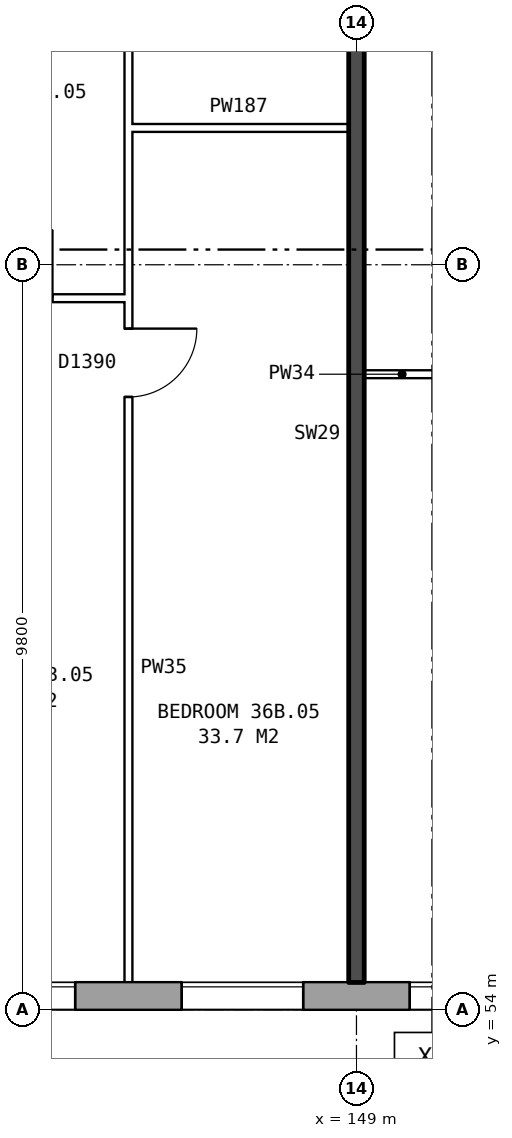
"""IFC4 building model, lengths in metres.
Left out: names, types, materials, properties, quantities, classifications, styles, units other than length and angle.
Written with IfcOpenShell. Run it as: python <this file> out.ifc"""

import sys

from ifc_helpers import new_model, si_unit, direction, frame, frame_2d, origin, place, context, subcontext, project, spatial, rectangle, extrude, element, fill, save


model = new_model("IFC4")
c1 = context("Model", 3, precision=1e-05, world=origin(), true_north=direction((0.0, 1.0)))
c2 = subcontext(c1, "Body", "Model", "MODEL_VIEW")
j1 = project(units=[si_unit("LENGTHUNIT", "METRE"), si_unit("PLANEANGLEUNIT", "RADIAN")], contexts=[c1])
p1 = place(None, origin())
s1 = spatial("IfcSite", under=j1, at=p1, CompositionType="ELEMENT")
p2 = place(p1, origin())
s2 = spatial("IfcBuilding", under=s1, at=p2, CompositionType="ELEMENT")
p3 = place(p2, frame((0.0, 0.0, 129.9)))
s3 = spatial("IfcBuildingStorey", under=s2, at=p3, CompositionType="ELEMENT", Elevation=129.9)
p4 = place(p3, frame((134.075, 54.18, 0.0), z_axis=(0.0, 0.0, 1.0), x_axis=(1.0, 0.0, 0.0)))
e1 = element("IfcWall", 1, at=p4, inside=s3, PredefinedType="STANDARD", context=c2, shape_type="SweptSolid", body=[
    extrude(rectangle(XDim=35.601, YDim=0.36, at=frame_2d((17.8, 0.0))), origin(), (0.0, 0.0, 1.0), 2.85),
])
p5 = place(p4, frame((0.625, 0.0, 0.8)))
e2 = element("IfcOpeningElement", 2, at=p5, cuts=e1, PredefinedType="OPENING", context=c2, shape_type="SweptSolid", body=[
    extrude(rectangle(XDim=1.6, YDim=1.8, at=frame_2d((0.8, 0.9))), frame((0.0, 0.19, 0.0), z_axis=(0.0, -1.0, 0.0), x_axis=(1.0, 0.0, 0.0)), (0.0, 0.0, 1.0), 0.38),
])
p6 = place(p4, frame((3.625, 0.0, 0.8)))
e3 = element("IfcOpeningElement", 3, at=p6, cuts=e1, PredefinedType="OPENING", context=c2, shape_type="SweptSolid", body=[
    extrude(rectangle(XDim=1.6, YDim=1.8, at=frame_2d((0.8, 0.9))), frame((0.0, 0.19, 0.0), z_axis=(0.0, -1.0, 0.0), x_axis=(1.0, 0.0, 0.0)), (0.0, 0.0, 1.0), 0.38),
])
p7 = place(p4, frame((5.525, 0.0, 0.8)))
e4 = element("IfcOpeningElement", 4, at=p7, cuts=e1, PredefinedType="OPENING", context=c2, shape_type="SweptSolid", body=[
    extrude(rectangle(XDim=1.2, YDim=1.8, at=frame_2d((0.6, 0.9))), frame((0.0, 0.19, 0.0), z_axis=(0.0, -1.0, 0.0), x_axis=(1.0, 0.0, 0.0)), (0.0, 0.0, 1.0), 0.38),
])
p8 = place(p4, frame((9.625, 0.0, 0.8)))
e5 = element("IfcOpeningElement", 5, at=p8, cuts=e1, PredefinedType="OPENING", context=c2, shape_type="SweptSolid", body=[
    extrude(rectangle(XDim=1.6, YDim=1.8, at=frame_2d((0.8, 0.9))), frame((0.0, 0.19, 0.0), z_axis=(0.0, -1.0, 0.0), x_axis=(1.0, 0.0, 0.0)), (0.0, 0.0, 1.0), 0.38),
])
p9 = place(p4, frame((12.625, 0.0, 0.8)))
e6 = element("IfcOpeningElement", 6, at=p9, cuts=e1, PredefinedType="OPENING", context=c2, shape_type="SweptSolid", body=[
    extrude(rectangle(XDim=1.6, YDim=1.8, at=frame_2d((0.8, 0.9))), frame((0.0, 0.19, 0.0), z_axis=(0.0, -1.0, 0.0), x_axis=(1.0, 0.0, 0.0)), (0.0, 0.0, 1.0), 0.38),
])
p10 = place(p4, frame((15.625, 0.0, 0.8)))
e7 = element("IfcOpeningElement", 7, at=p10, cuts=e1, PredefinedType="OPENING", context=c2, shape_type="SweptSolid", body=[
    extrude(rectangle(XDim=1.6, YDim=1.8, at=frame_2d((0.8, 0.9))), frame((0.0, 0.19, 0.0), z_axis=(0.0, -1.0, 0.0), x_axis=(1.0, 0.0, 0.0)), (0.0, 0.0, 1.0), 0.38),
])
p11 = place(p4, frame((18.625, 0.0, 0.8)))
e8 = element("IfcOpeningElement", 8, at=p11, cuts=e1, PredefinedType="OPENING", context=c2, shape_type="SweptSolid", body=[
    extrude(rectangle(XDim=1.6, YDim=1.8, at=frame_2d((0.8, 0.9))), frame((0.0, 0.19, 0.0), z_axis=(0.0, -1.0, 0.0), x_axis=(1.0, 0.0, 0.0)), (0.0, 0.0, 1.0), 0.38),
])
p12 = place(p4, frame((21.625, 0.0, 0.8)))
e9 = element("IfcOpeningElement", 9, at=p12, cuts=e1, PredefinedType="OPENING", context=c2, shape_type="SweptSolid", body=[
    extrude(rectangle(XDim=1.6, YDim=1.8, at=frame_2d((0.8, 0.9))), frame((0.0, 0.19, 0.0), z_axis=(0.0, -1.0, 0.0), x_axis=(1.0, 0.0, 0.0)), (0.0, 0.0, 1.0), 0.38),
])
p13 = place(p4, frame((24.625, 0.0, 0.8)))
e10 = element("IfcOpeningElement", 10, at=p13, cuts=e1, PredefinedType="OPENING", context=c2, shape_type="SweptSolid", body=[
    extrude(rectangle(XDim=1.6, YDim=1.8, at=frame_2d((0.8, 0.9))), frame((0.0, 0.19, 0.0), z_axis=(0.0, -1.0, 0.0), x_axis=(1.0, 0.0, 0.0)), (0.0, 0.0, 1.0), 0.38),
])
p14 = place(p4, frame((27.825, 0.0, 1.7)))
e11 = element("IfcOpeningElement", 11, at=p14, cuts=e1, PredefinedType="OPENING", context=c2, shape_type="SweptSolid", body=[
    extrude(rectangle(XDim=0.6, YDim=0.9, at=frame_2d((0.3, 0.45))), frame((0.0, 0.19, 0.0), z_axis=(0.0, -1.0, 0.0), x_axis=(1.0, 0.0, 0.0)), (0.0, 0.0, 1.0), 0.38),
])
p15 = place(p4, frame((30.625, 0.0, 0.8)))
e12 = element("IfcOpeningElement", 12, at=p15, cuts=e1, PredefinedType="OPENING", context=c2, shape_type="SweptSolid", body=[
    extrude(rectangle(XDim=1.6, YDim=1.8, at=frame_2d((0.8, 0.9))), frame((0.0, 0.19, 0.0), z_axis=(0.0, -1.0, 0.0), x_axis=(1.0, 0.0, 0.0)), (0.0, 0.0, 1.0), 0.38),
])
p16 = place(p4, frame((33.625, 0.0, 0.8)))
e13 = element("IfcOpeningElement", 13, at=p16, cuts=e1, PredefinedType="OPENING", context=c2, shape_type="SweptSolid", body=[
    extrude(rectangle(XDim=1.6, YDim=1.8, at=frame_2d((0.8, 0.9))), frame((0.0, 0.19, 0.0), z_axis=(0.0, -1.0, 0.0), x_axis=(1.0, 0.0, 0.0)), (0.0, 0.0, 1.0), 0.38),
])
p17 = place(p4, frame((7.025, 0.0, 1.6)))
e14 = element("IfcOpeningElement", 14, at=p17, cuts=e1, PredefinedType="OPENING", context=c2, shape_type="SweptSolid", body=[
    extrude(rectangle(XDim=0.6, YDim=0.9, at=frame_2d((0.3, 0.45))), frame((0.0, 0.19, 0.0), z_axis=(0.0, -1.0, 0.0), x_axis=(1.0, 0.0, 0.0)), (0.0, 0.0, 1.0), 0.38),
])
p18 = place(p4, frame((28.725, 0.0, 0.8)))
e15 = element("IfcOpeningElement", 15, at=p18, cuts=e1, PredefinedType="OPENING", context=c2, shape_type="SweptSolid", body=[
    extrude(rectangle(XDim=1.6, YDim=1.8, at=frame_2d((0.8, 0.9))), frame((0.0, 0.19, 0.0), z_axis=(0.0, -1.0, 0.0), x_axis=(1.0, 0.0, 0.0)), (0.0, 0.0, 1.0), 0.38),
])
p19 = place(p3, frame((149.1, 62.36, 0.0), z_axis=(0.0, 0.0, 1.0), x_axis=(1.0, 0.0, 0.0)))
e16 = element("IfcWall", 16, at=p19, inside=s3, PredefinedType="PARTITIONING", context=c2, shape_type="SweptSolid", body=[
    extrude(rectangle(XDim=2.9, YDim=0.1, at=frame_2d((1.45, 0.0))), origin(), (0.0, 0.0, 1.0), 2.85),
])
p20 = place(p19, frame((1.0, 0.0, 0.0)))
e17 = element("IfcOpeningElement", 17, at=p20, cuts=e16, PredefinedType="OPENING", context=c2, shape_type="SweptSolid", body=[
    extrude(rectangle(XDim=0.9, YDim=2.1, at=frame_2d((0.45, 1.05))), frame((0.0, 0.06, 0.0), z_axis=(0.0, -1.0, 0.0), x_axis=(1.0, 0.0, 0.0)), (0.0, 0.0, 1.0), 0.12),
])
p21 = place(p3, frame((143.1, 63.36, 0.0), z_axis=(0.0, 0.0, 1.0), x_axis=(1.0, 0.0, 0.0)))
e18 = element("IfcWall", 18, at=p21, inside=s3, PredefinedType="PARTITIONING", context=c2, shape_type="SweptSolid", body=[
    extrude(rectangle(XDim=2.9, YDim=0.1, at=frame_2d((1.45, 0.0))), origin(), (0.0, 0.0, 1.0), 2.85),
])
p22 = place(p21, frame((1.0, 0.0, 0.0)))
e19 = element("IfcOpeningElement", 19, at=p22, cuts=e18, PredefinedType="OPENING", context=c2, shape_type="SweptSolid", body=[
    extrude(rectangle(XDim=0.9, YDim=2.1, at=frame_2d((0.45, 1.05))), frame((0.0, 0.06, 0.0), z_axis=(0.0, -1.0, 0.0), x_axis=(1.0, 0.0, 0.0)), (0.0, 0.0, 1.0), 0.12),
])
p23 = place(p3, frame((146.0, 65.6, 0.0), z_axis=(0.0, 0.0, 1.0), x_axis=(1.0, 0.0, 0.0)))
e20 = element("IfcWall", 20, at=p23, inside=s3, PredefinedType="PARTITIONING", context=c2, shape_type="SweptSolid", body=[
    extrude(rectangle(XDim=2.9, YDim=0.1, at=frame_2d((1.45, 0.0))), origin(), (0.0, 0.0, 1.0), 2.85),
])
p24 = place(p3, frame((146.0, 54.36, 0.0), z_axis=(0.0, 0.0, 1.0), x_axis=(0.0, 1.0, 0.0)))
e21 = element("IfcWall", 21, at=p24, inside=s3, PredefinedType="PARTITIONING", context=c2, shape_type="SweptSolid", body=[
    extrude(rectangle(XDim=14.34, YDim=0.1, at=frame_2d((7.17, 0.0))), origin(), (0.0, 0.0, 1.0), 2.85),
])
p25 = place(p24, frame((7.7, 0.0, 0.0)))
e22 = element("IfcOpeningElement", 22, at=p25, cuts=e21, PredefinedType="OPENING", context=c2, shape_type="SweptSolid", body=[
    extrude(rectangle(XDim=0.9, YDim=2.1, at=frame_2d((0.45, 1.05))), frame((0.0, 0.06, 0.0), z_axis=(0.0, -1.0, 0.0), x_axis=(1.0, 0.0, 0.0)), (0.0, 0.0, 1.0), 0.12),
])
p26 = place(p24, frame((13.04, 0.0, 0.0)))
e23 = element("IfcOpeningElement", 23, at=p26, cuts=e21, PredefinedType="OPENING", context=c2, shape_type="SweptSolid", body=[
    extrude(rectangle(XDim=0.9, YDim=2.1, at=frame_2d((0.45, 1.05))), frame((0.0, 0.06, 0.0), z_axis=(0.0, -1.0, 0.0), x_axis=(1.0, 0.0, 0.0)), (0.0, 0.0, 1.0), 0.12),
])
p27 = place(p3, frame((149.0, 54.36, 0.0), z_axis=(0.0, 0.0, 1.0), x_axis=(0.0, 1.0, 0.0)))
e24 = element("IfcWall", 24, at=p27, inside=s3, PredefinedType="SOLIDWALL", context=c2, shape_type="SweptSolid", body=[
    extrude(rectangle(XDim=14.44, YDim=0.2, at=frame_2d((7.22, 0.0))), origin(), (0.0, 0.0, 1.0), 2.85),
])
p28 = place(p8, origin())
e25 = element("IfcWindow", 25, at=p28, inside=s3, PartitioningType="SINGLE_PANEL", PredefinedType="WINDOW", context=c2, shape_type="SweptSolid", body=[
    extrude(rectangle(XDim=1.6, YDim=1.8, at=frame_2d((0.8, 0.9))), frame((0.0, 0.15, 0.0), z_axis=(0.0, -1.0, 0.0), x_axis=(1.0, 0.0, 0.0)), (0.0, 0.0, 1.0), 0.06),
])
fill(e5, e25)
p29 = place(p9, origin())
e26 = element("IfcWindow", 26, at=p29, inside=s3, PartitioningType="SINGLE_PANEL", PredefinedType="WINDOW", context=c2, shape_type="SweptSolid", body=[
    extrude(rectangle(XDim=1.6, YDim=1.8, at=frame_2d((0.8, 0.9))), frame((0.0, 0.15, 0.0), z_axis=(0.0, -1.0, 0.0), x_axis=(1.0, 0.0, 0.0)), (0.0, 0.0, 1.0), 0.06),
])
fill(e6, e26)
p30 = place(p10, origin())
e27 = element("IfcWindow", 27, at=p30, inside=s3, PartitioningType="SINGLE_PANEL", PredefinedType="WINDOW", context=c2, shape_type="SweptSolid", body=[
    extrude(rectangle(XDim=1.6, YDim=1.8, at=frame_2d((0.8, 0.9))), frame((0.0, 0.15, 0.0), z_axis=(0.0, -1.0, 0.0), x_axis=(1.0, 0.0, 0.0)), (0.0, 0.0, 1.0), 0.06),
])
fill(e7, e27)
p31 = place(p25, frame((0.9, 0.0, 0.0), z_axis=(0.0, 0.0, 1.0), x_axis=(-1.0, 0.0, 0.0)))
e28 = element("IfcDoor", 28, at=p31, inside=s3, OperationType="SINGLE_SWING_LEFT", PredefinedType="DOOR", context=c2, shape_type="SweptSolid", body=[
    extrude(rectangle(XDim=0.9, YDim=2.1, at=frame_2d((0.45, 1.05))), frame((0.0, 0.025, 0.0), z_axis=(0.0, -1.0, 0.0), x_axis=(1.0, 0.0, 0.0)), (0.0, 0.0, 1.0), 0.05),
])
fill(e22, e28)
save(model, sys.argv[1])
